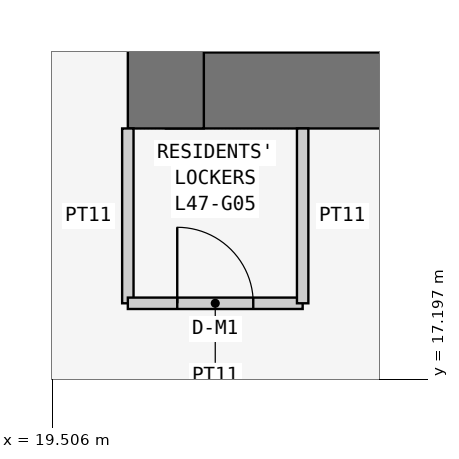
"""IFC4 building model, lengths in metres.
Left out: names, types, materials, properties, quantities, classifications, styles, units other than length and angle.
Written with IfcOpenShell. Run it as: python <this file> out.ifc"""

import sys

from ifc_helpers import new_model, si_unit, direction, frame, frame_2d, origin, place, context, subcontext, project, spatial, rectangle, extrude, element, fill, save


model = new_model("IFC4")
c1 = context("Model", 3, precision=1e-05, world=origin(), true_north=direction((0.0, 1.0)))
c2 = subcontext(c1, "Body", "Model", "MODEL_VIEW")
j1 = project(units=[si_unit("LENGTHUNIT", "METRE"), si_unit("PLANEANGLEUNIT", "RADIAN")], contexts=[c1])
p1 = place(None, origin())
s1 = spatial("IfcSite", under=j1, at=p1, CompositionType="ELEMENT")
p2 = place(p1, origin())
s2 = spatial("IfcBuilding", under=s1, at=p2, CompositionType="ELEMENT")
p3 = place(p2, frame((0.0, 0.0, 183.3)))
s3 = spatial("IfcBuildingStorey", under=s2, at=p3, CompositionType="ELEMENT", Elevation=183.3)
p4 = place(p3, frame((21.0, 21.0, 0.0), z_axis=(0.0, 0.0, 1.0), x_axis=(1.0, 0.0, 0.0)))
e1 = element("IfcWall", 1, at=p4, inside=s3, PredefinedType="SHEAR", context=c2, shape_type="SweptSolid", body=[
    extrude(rectangle(XDim=17.3, YDim=1.0, at=frame_2d((8.65, 0.0))), origin(), (0.0, 0.0, 1.0), 3.6),
])
p5 = place(p3, frame((21.0, 37.8, 0.0), z_axis=(0.0, 0.0, 1.0), x_axis=(0.0, -1.0, 0.0)))
e2 = element("IfcWall", 2, at=p5, inside=s3, PredefinedType="SHEAR", context=c2, shape_type="SweptSolid", body=[
    extrude(rectangle(XDim=17.3, YDim=1.0, at=frame_2d((8.65, 0.0))), origin(), (0.0, 0.0, 1.0), 3.6),
])
p6 = place(p5, frame((5.4, 0.0, 0.0)))
e3 = element("IfcOpeningElement", 3, at=p6, cuts=e2, PredefinedType="OPENING", context=c2, shape_type="SweptSolid", body=[
    extrude(rectangle(XDim=1.2, YDim=2.1, at=frame_2d((0.6, 1.05))), frame((0.0, 0.51, 0.0), z_axis=(0.0, -1.0, 0.0), x_axis=(1.0, 0.0, 0.0)), (0.0, 0.0, 1.0), 1.02),
])
p7 = place(p3, frame((20.5, 20.5, 0.0), z_axis=(0.0, 0.0, 1.0), x_axis=(0.0, -1.0, 0.0)))
e4 = element("IfcWall", 4, at=p7, inside=s3, PredefinedType="PARTITIONING", context=c2, shape_type="SweptSolid", body=[
    extrude(rectangle(XDim=2.3, YDim=0.15, at=frame_2d((1.15, 0.0))), origin(), (0.0, 0.0, 1.0), 3.45),
])
p8 = place(p3, frame((20.5, 18.2, 0.0), z_axis=(0.0, 0.0, 1.0), x_axis=(1.0, 0.0, 0.0)))
e5 = element("IfcWall", 5, at=p8, inside=s3, PredefinedType="PARTITIONING", context=c2, shape_type="SweptSolid", body=[
    extrude(rectangle(XDim=2.3, YDim=0.15, at=frame_2d((1.15, 0.0))), origin(), (0.0, 0.0, 1.0), 3.45),
])
p9 = place(p8, frame((0.65, 0.0, 0.0)))
e6 = element("IfcOpeningElement", 6, at=p9, cuts=e5, PredefinedType="OPENING", context=c2, shape_type="SweptSolid", body=[
    extrude(rectangle(XDim=1.0, YDim=2.1, at=frame_2d((0.5, 1.05))), frame((0.0, 0.085, 0.0), z_axis=(0.0, -1.0, 0.0), x_axis=(1.0, 0.0, 0.0)), (0.0, 0.0, 1.0), 0.17),
])
p10 = place(p3, frame((22.8, 18.2, 0.0), z_axis=(0.0, 0.0, 1.0), x_axis=(0.0, 1.0, 0.0)))
e7 = element("IfcWall", 7, at=p10, inside=s3, PredefinedType="PARTITIONING", context=c2, shape_type="SweptSolid", body=[
    extrude(rectangle(XDim=2.3, YDim=0.15, at=frame_2d((1.15, 0.0))), origin(), (0.0, 0.0, 1.0), 3.45),
])
p11 = place(p9, origin())
e8 = element("IfcDoor", 8, at=p11, inside=s3, OperationType="SINGLE_SWING_LEFT", PredefinedType="DOOR", context=c2, shape_type="SweptSolid", body=[
    extrude(rectangle(XDim=1.0, YDim=2.1, at=frame_2d((0.5, 1.05))), frame((0.0, 0.025, 0.0), z_axis=(0.0, -1.0, 0.0), x_axis=(1.0, 0.0, 0.0)), (0.0, 0.0, 1.0), 0.05),
])
fill(e6, e8)
save(model, sys.argv[1])
